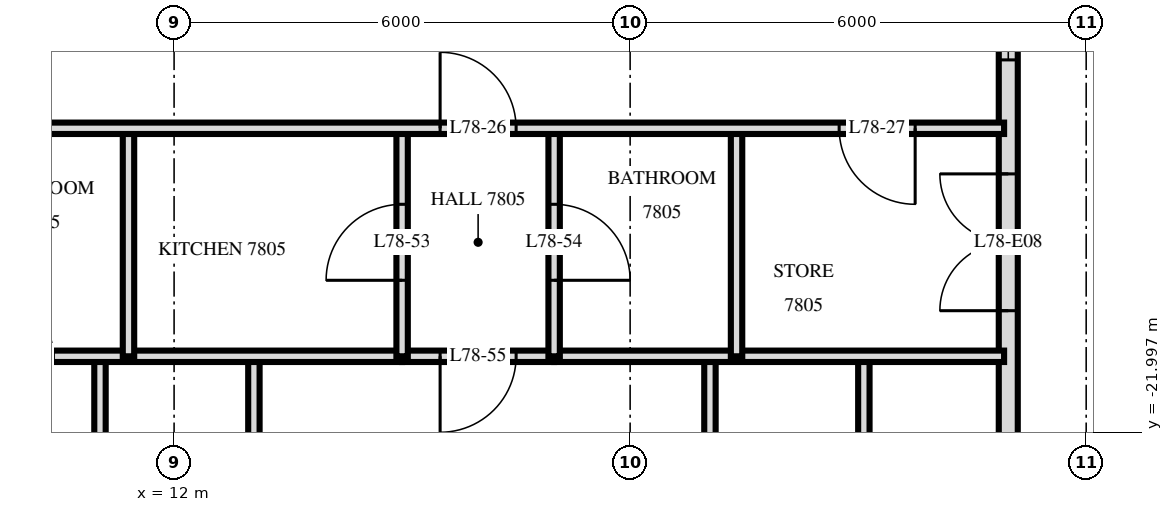
"""IFC4 building model, lengths in metres.
Left out: names, types, materials, properties, quantities, classifications, styles, units other than length and angle.
Written with IfcOpenShell. Run it as: python <this file> out.ifc"""

import sys

from ifc_helpers import new_model, si_unit, direction, frame, frame_2d, origin, place, context, subcontext, project, spatial, rectangle, extrude, element, fill, save


model = new_model("IFC4")
c1 = context("Model", 3, precision=1e-05, world=origin(), true_north=direction((0.0, 1.0)))
c2 = subcontext(c1, "Body", "Model", "MODEL_VIEW")
j1 = project(units=[si_unit("LENGTHUNIT", "METRE"), si_unit("PLANEANGLEUNIT", "RADIAN")], contexts=[c1])
p1 = place(None, origin())
s1 = spatial("IfcSite", under=j1, at=p1, CompositionType="ELEMENT")
p2 = place(p1, origin())
s2 = spatial("IfcBuilding", under=s1, at=p2, CompositionType="ELEMENT")
p3 = place(p2, frame((0.0, 0.0, 294.6)))
s3 = spatial("IfcBuildingStorey", under=s2, at=p3, CompositionType="ELEMENT", Elevation=294.6)
p4 = place(p3, frame((22.975, -29.275, 0.0), z_axis=(0.0, 0.0, 1.0), x_axis=(0.0, 1.0, 0.0)))
e1 = element("IfcWall", 1, at=p4, inside=s3, PredefinedType="SOLIDWALL", context=c2, shape_type="SweptSolid", body=[
    extrude(rectangle(XDim=25.951, YDim=0.25, at=frame_2d((12.975, 0.0))), origin(), (0.0, 0.0, 1.0), 3.22),
])
p5 = place(p4, frame((0.575, 0.0, 0.0)))
e2 = element("IfcOpeningElement", 2, at=p5, cuts=e1, PredefinedType="OPENING", context=c2, shape_type="SweptSolid", body=[
    extrude(rectangle(XDim=1.8, YDim=2.4, at=frame_2d((0.9, 1.2))), frame((0.0, 0.135, 0.0), z_axis=(0.0, -1.0, 0.0), x_axis=(1.0, 0.0, 0.0)), (0.0, 0.0, 1.0), 0.27),
])
p6 = place(p4, frame((3.325, 0.0, 0.9)))
e3 = element("IfcOpeningElement", 3, at=p6, cuts=e1, PredefinedType="OPENING", context=c2, shape_type="SweptSolid", body=[
    extrude(rectangle(XDim=1.8, YDim=1.5, at=frame_2d((0.9, 0.75))), frame((0.0, 0.135, 0.0), z_axis=(0.0, -1.0, 0.0), x_axis=(1.0, 0.0, 0.0)), (0.0, 0.0, 1.0), 0.27),
])
p7 = place(p4, frame((8.875, 0.0, 0.0)))
e4 = element("IfcOpeningElement", 4, at=p7, cuts=e1, PredefinedType="OPENING", context=c2, shape_type="SweptSolid", body=[
    extrude(rectangle(XDim=1.8, YDim=2.4, at=frame_2d((0.9, 1.2))), frame((0.0, 0.135, 0.0), z_axis=(0.0, -1.0, 0.0), x_axis=(1.0, 0.0, 0.0)), (0.0, 0.0, 1.0), 0.27),
])
p8 = place(p4, frame((12.175, 0.0, 0.9)))
e5 = element("IfcOpeningElement", 5, at=p8, cuts=e1, PredefinedType="OPENING", context=c2, shape_type="SweptSolid", body=[
    extrude(rectangle(XDim=1.2, YDim=1.5, at=frame_2d((0.6, 0.75))), frame((0.0, 0.135, 0.0), z_axis=(0.0, -1.0, 0.0), x_axis=(1.0, 0.0, 0.0)), (0.0, 0.0, 1.0), 0.27),
])
p9 = place(p4, frame((16.175, 0.0, 0.0)))
e6 = element("IfcOpeningElement", 6, at=p9, cuts=e1, PredefinedType="OPENING", context=c2, shape_type="SweptSolid", body=[
    extrude(rectangle(XDim=1.8, YDim=2.4, at=frame_2d((0.9, 1.2))), frame((0.0, 0.135, 0.0), z_axis=(0.0, -1.0, 0.0), x_axis=(1.0, 0.0, 0.0)), (0.0, 0.0, 1.0), 0.27),
])
p10 = place(p4, frame((23.425, 0.0, 0.0)))
e7 = element("IfcOpeningElement", 7, at=p10, cuts=e1, PredefinedType="OPENING", context=c2, shape_type="SweptSolid", body=[
    extrude(rectangle(XDim=1.8, YDim=2.4, at=frame_2d((0.9, 1.2))), frame((0.0, 0.135, 0.0), z_axis=(0.0, -1.0, 0.0), x_axis=(1.0, 0.0, 0.0)), (0.0, 0.0, 1.0), 0.27),
])
p11 = place(p3, frame((21.075, -32.666, 0.0), z_axis=(0.0, 0.0, 1.0), x_axis=(0.0, 1.0, 0.0)))
e8 = element("IfcWall", 8, at=p11, inside=s3, PredefinedType="PARTITIONING", context=c2, shape_type="SweptSolid", body=[
    extrude(rectangle(XDim=11.666, YDim=0.15, at=frame_2d((5.833, 0.0))), origin(), (0.0, 0.0, 1.0), 3.22),
])
p12 = place(p11, frame((5.246, 0.0, 0.0)))
e9 = element("IfcOpeningElement", 9, at=p12, cuts=e8, PredefinedType="OPENING", context=c2, shape_type="SweptSolid", body=[
    extrude(rectangle(XDim=0.9, YDim=2.1, at=frame_2d((0.45, 1.05))), frame((0.0, 0.085, 0.0), z_axis=(0.0, -1.0, 0.0), x_axis=(1.0, 0.0, 0.0)), (0.0, 0.0, 1.0), 0.17),
])
p13 = place(p3, frame((19.4, -21.0, 0.0), z_axis=(0.0, 0.0, 1.0), x_axis=(0.0, 1.0, 0.0)))
e10 = element("IfcWall", 10, at=p13, inside=s3, PredefinedType="PARTITIONING", context=c2, shape_type="SweptSolid", body=[
    extrude(rectangle(XDim=3.0, YDim=0.15, at=frame_2d((1.5, 0.0))), origin(), (0.0, 0.0, 1.0), 3.22),
])
p14 = place(p3, frame((19.05, -33.527, 0.0), z_axis=(0.0, 0.0, 1.0), x_axis=(0.0, 1.0, 0.0)))
e11 = element("IfcWall", 11, at=p14, inside=s3, PredefinedType="PARTITIONING", context=c2, shape_type="SweptSolid", body=[
    extrude(rectangle(XDim=12.527, YDim=0.15, at=frame_2d((6.264, 0.0))), origin(), (0.0, 0.0, 1.0), 3.22),
])
p15 = place(p14, frame((5.707, 0.0, 0.0)))
e12 = element("IfcOpeningElement", 12, at=p15, cuts=e11, PredefinedType="OPENING", context=c2, shape_type="SweptSolid", body=[
    extrude(rectangle(XDim=0.9, YDim=2.1, at=frame_2d((0.45, 1.05))), frame((0.0, 0.085, 0.0), z_axis=(0.0, -1.0, 0.0), x_axis=(1.0, 0.0, 0.0)), (0.0, 0.0, 1.0), 0.17),
])
p16 = place(p3, frame((17.0, -21.0, 0.0), z_axis=(0.0, 0.0, 1.0), x_axis=(0.0, 1.0, 0.0)))
e13 = element("IfcWall", 13, at=p16, inside=s3, PredefinedType="PARTITIONING", context=c2, shape_type="SweptSolid", body=[
    extrude(rectangle(XDim=3.0, YDim=0.15, at=frame_2d((1.5, 0.0))), origin(), (0.0, 0.0, 1.0), 3.22),
])
p17 = place(p16, frame((1.0, 0.0, 0.0)))
e14 = element("IfcOpeningElement", 14, at=p17, cuts=e13, PredefinedType="OPENING", context=c2, shape_type="SweptSolid", body=[
    extrude(rectangle(XDim=1.0, YDim=2.1, at=frame_2d((0.5, 1.05))), frame((0.0, 0.085, 0.0), z_axis=(0.0, -1.0, 0.0), x_axis=(1.0, 0.0, 0.0)), (0.0, 0.0, 1.0), 0.17),
])
p18 = place(p3, frame((15.0, -21.0, 0.0), z_axis=(0.0, 0.0, 1.0), x_axis=(0.0, 1.0, 0.0)))
e15 = element("IfcWall", 15, at=p18, inside=s3, PredefinedType="PARTITIONING", context=c2, shape_type="SweptSolid", body=[
    extrude(rectangle(XDim=3.0, YDim=0.15, at=frame_2d((1.5, 0.0))), origin(), (0.0, 0.0, 1.0), 3.22),
])
p19 = place(p18, frame((1.0, 0.0, 0.0)))
e16 = element("IfcOpeningElement", 16, at=p19, cuts=e15, PredefinedType="OPENING", context=c2, shape_type="SweptSolid", body=[
    extrude(rectangle(XDim=1.0, YDim=2.1, at=frame_2d((0.5, 1.05))), frame((0.0, 0.085, 0.0), z_axis=(0.0, -1.0, 0.0), x_axis=(1.0, 0.0, 0.0)), (0.0, 0.0, 1.0), 0.17),
])
p20 = place(p3, frame((13.05, -33.62, 0.0), z_axis=(0.0, 0.0, 1.0), x_axis=(0.0, 1.0, 0.0)))
e17 = element("IfcWall", 17, at=p20, inside=s3, PredefinedType="PARTITIONING", context=c2, shape_type="SweptSolid", body=[
    extrude(rectangle(XDim=12.62, YDim=0.15, at=frame_2d((6.31, 0.0))), origin(), (0.0, 0.0, 1.0), 3.22),
])
p21 = place(p20, frame((5.79, 0.0, 0.0)))
e18 = element("IfcOpeningElement", 18, at=p21, cuts=e17, PredefinedType="OPENING", context=c2, shape_type="SweptSolid", body=[
    extrude(rectangle(XDim=0.9, YDim=2.1, at=frame_2d((0.45, 1.05))), frame((0.0, 0.085, 0.0), z_axis=(0.0, -1.0, 0.0), x_axis=(1.0, 0.0, 0.0)), (0.0, 0.0, 1.0), 0.17),
])
p22 = place(p3, frame((11.4, -21.0, 0.0), z_axis=(0.0, 0.0, 1.0), x_axis=(0.0, 1.0, 0.0)))
e19 = element("IfcWall", 19, at=p22, inside=s3, PredefinedType="PARTITIONING", context=c2, shape_type="SweptSolid", body=[
    extrude(rectangle(XDim=3.0, YDim=0.15, at=frame_2d((1.5, 0.0))), origin(), (0.0, 0.0, 1.0), 3.22),
])
p23 = place(p3, frame((11.025, -33.62, 0.0), z_axis=(0.0, 0.0, 1.0), x_axis=(0.0, 1.0, 0.0)))
e20 = element("IfcWall", 20, at=p23, inside=s3, PredefinedType="PARTITIONING", context=c2, shape_type="SweptSolid", body=[
    extrude(rectangle(XDim=12.62, YDim=0.15, at=frame_2d((6.31, 0.0))), origin(), (0.0, 0.0, 1.0), 3.22),
])
p24 = place(p23, frame((5.79, 0.0, 0.0)))
e21 = element("IfcOpeningElement", 21, at=p24, cuts=e20, PredefinedType="OPENING", context=c2, shape_type="SweptSolid", body=[
    extrude(rectangle(XDim=0.9, YDim=2.1, at=frame_2d((0.45, 1.05))), frame((0.0, 0.085, 0.0), z_axis=(0.0, -1.0, 0.0), x_axis=(1.0, 0.0, 0.0)), (0.0, 0.0, 1.0), 0.17),
])
p25 = place(p3, frame((15.0, -21.0, 0.0), z_axis=(0.0, 0.0, 1.0), x_axis=(1.0, 0.0, 0.0)))
e22 = element("IfcWall", 22, at=p25, inside=s3, PredefinedType="PARTITIONING", context=c2, shape_type="SweptSolid", body=[
    extrude(rectangle(XDim=2.0, YDim=0.15, at=frame_2d((1.0, 0.0))), origin(), (0.0, 0.0, 1.0), 3.22),
])
p26 = place(p25, frame((0.5, 0.0, 0.0)))
e23 = element("IfcOpeningElement", 23, at=p26, cuts=e22, PredefinedType="OPENING", context=c2, shape_type="SweptSolid", body=[
    extrude(rectangle(XDim=1.0, YDim=2.1, at=frame_2d((0.5, 1.05))), frame((0.0, 0.085, 0.0), z_axis=(0.0, -1.0, 0.0), x_axis=(1.0, 0.0, 0.0)), (0.0, 0.0, 1.0), 0.17),
])
p27 = place(p3, frame((9.0, -21.0, 0.0), z_axis=(0.0, 0.0, 1.0), x_axis=(1.0, 0.0, 0.0)))
e24 = element("IfcWall", 24, at=p27, inside=s3, PredefinedType="PARTITIONING", context=c2, shape_type="SweptSolid", body=[
    extrude(rectangle(XDim=6.0, YDim=0.15, at=frame_2d((3.0, 0.0))), origin(), (0.0, 0.0, 1.0), 3.22),
])
p28 = place(p27, frame((0.612, 0.0, 0.0)))
e25 = element("IfcOpeningElement", 25, at=p28, cuts=e24, PredefinedType="OPENING", context=c2, shape_type="SweptSolid", body=[
    extrude(rectangle(XDim=0.8, YDim=2.1, at=frame_2d((0.4, 1.05))), frame((0.0, 0.085, 0.0), z_axis=(0.0, -1.0, 0.0), x_axis=(1.0, 0.0, 0.0)), (0.0, 0.0, 1.0), 0.17),
])
p29 = place(p3, frame((17.0, -21.0, 0.0), z_axis=(0.0, 0.0, 1.0), x_axis=(1.0, 0.0, 0.0)))
e26 = element("IfcWall", 26, at=p29, inside=s3, PredefinedType="PARTITIONING", context=c2, shape_type="SweptSolid", body=[
    extrude(rectangle(XDim=5.92, YDim=0.15, at=frame_2d((2.96, 0.0))), origin(), (0.0, 0.0, 1.0), 3.22),
])
p30 = place(p3, frame((-22.92, -18.0, 0.0), z_axis=(0.0, 0.0, 1.0), x_axis=(1.0, 0.0, 0.0)))
e27 = element("IfcWall", 27, at=p30, inside=s3, PredefinedType="PARTITIONING", context=c2, shape_type="SweptSolid", body=[
    extrude(rectangle(XDim=45.84, YDim=0.15, at=frame_2d((22.92, 0.0))), origin(), (0.0, 0.0, 1.0), 3.22),
])
p31 = place(p30, frame((17.07, 0.0, 0.0)))
e28 = element("IfcOpeningElement", 28, at=p31, cuts=e27, PredefinedType="OPENING", context=c2, shape_type="SweptSolid", body=[
    extrude(rectangle(XDim=1.0, YDim=2.1, at=frame_2d((0.5, 1.05))), frame((0.0, 0.085, 0.0), z_axis=(0.0, -1.0, 0.0), x_axis=(1.0, 0.0, 0.0)), (0.0, 0.0, 1.0), 0.17),
])
p32 = place(p30, frame((21.77, 0.0, 0.0)))
e29 = element("IfcOpeningElement", 29, at=p32, cuts=e27, PredefinedType="OPENING", context=c2, shape_type="SweptSolid", body=[
    extrude(rectangle(XDim=1.0, YDim=2.1, at=frame_2d((0.5, 1.05))), frame((0.0, 0.085, 0.0), z_axis=(0.0, -1.0, 0.0), x_axis=(1.0, 0.0, 0.0)), (0.0, 0.0, 1.0), 0.17),
])
p33 = place(p30, frame((28.72, 0.0, 0.0)))
e30 = element("IfcOpeningElement", 30, at=p33, cuts=e27, PredefinedType="OPENING", context=c2, shape_type="SweptSolid", body=[
    extrude(rectangle(XDim=1.0, YDim=2.1, at=frame_2d((0.5, 1.05))), frame((0.0, 0.085, 0.0), z_axis=(0.0, -1.0, 0.0), x_axis=(1.0, 0.0, 0.0)), (0.0, 0.0, 1.0), 0.17),
])
p34 = place(p30, frame((30.52, 0.0, 0.0)))
e31 = element("IfcOpeningElement", 31, at=p34, cuts=e27, PredefinedType="OPENING", context=c2, shape_type="SweptSolid", body=[
    extrude(rectangle(XDim=1.0, YDim=2.1, at=frame_2d((0.5, 1.05))), frame((0.0, 0.085, 0.0), z_axis=(0.0, -1.0, 0.0), x_axis=(1.0, 0.0, 0.0)), (0.0, 0.0, 1.0), 0.17),
])
p35 = place(p30, frame((9.42, 0.0, 0.0)))
e32 = element("IfcOpeningElement", 32, at=p35, cuts=e27, PredefinedType="OPENING", context=c2, shape_type="SweptSolid", body=[
    extrude(rectangle(XDim=1.0, YDim=2.1, at=frame_2d((0.5, 1.05))), frame((0.0, 0.085, 0.0), z_axis=(0.0, -1.0, 0.0), x_axis=(1.0, 0.0, 0.0)), (0.0, 0.0, 1.0), 0.17),
])
p36 = place(p30, frame((2.67, 0.0, 0.0)))
e33 = element("IfcOpeningElement", 33, at=p36, cuts=e27, PredefinedType="OPENING", context=c2, shape_type="SweptSolid", body=[
    extrude(rectangle(XDim=1.0, YDim=2.1, at=frame_2d((0.5, 1.05))), frame((0.0, 0.085, 0.0), z_axis=(0.0, -1.0, 0.0), x_axis=(1.0, 0.0, 0.0)), (0.0, 0.0, 1.0), 0.17),
])
p37 = place(p30, frame((38.42, 0.0, 0.0)))
e34 = element("IfcOpeningElement", 34, at=p37, cuts=e27, PredefinedType="OPENING", context=c2, shape_type="SweptSolid", body=[
    extrude(rectangle(XDim=1.0, YDim=2.1, at=frame_2d((0.5, 1.05))), frame((0.0, 0.085, 0.0), z_axis=(0.0, -1.0, 0.0), x_axis=(1.0, 0.0, 0.0)), (0.0, 0.0, 1.0), 0.17),
])
p38 = place(p30, frame((43.67, 0.0, 0.0)))
e35 = element("IfcOpeningElement", 35, at=p38, cuts=e27, PredefinedType="OPENING", context=c2, shape_type="SweptSolid", body=[
    extrude(rectangle(XDim=1.0, YDim=2.1, at=frame_2d((0.5, 1.05))), frame((0.0, 0.085, 0.0), z_axis=(0.0, -1.0, 0.0), x_axis=(1.0, 0.0, 0.0)), (0.0, 0.0, 1.0), 0.17),
])
p39 = place(p7, origin())
e36 = element("IfcDoor", 36, at=p39, inside=s3, OperationType="DOUBLE_DOOR_SINGLE_SWING", PredefinedType="DOOR", context=c2, shape_type="SweptSolid", body=[
    extrude(rectangle(XDim=1.8, YDim=2.4, at=frame_2d((0.9, 1.2))), frame((0.0, 0.025, 0.0), z_axis=(0.0, -1.0, 0.0), x_axis=(1.0, 0.0, 0.0)), (0.0, 0.0, 1.0), 0.05),
])
fill(e4, e36)
p40 = place(p8, origin())
e37 = element("IfcWindow", 37, at=p40, inside=s3, PartitioningType="SINGLE_PANEL", PredefinedType="WINDOW", context=c2, shape_type="SweptSolid", body=[
    extrude(rectangle(XDim=1.2, YDim=1.5, at=frame_2d((0.6, 0.75))), frame((0.0, 0.03, 0.0), z_axis=(0.0, -1.0, 0.0), x_axis=(1.0, 0.0, 0.0)), (0.0, 0.0, 1.0), 0.06),
])
fill(e5, e37)
p41 = place(p37, origin())
e38 = element("IfcDoor", 38, at=p41, inside=s3, OperationType="SINGLE_SWING_RIGHT", PredefinedType="DOOR", context=c2, shape_type="SweptSolid", body=[
    extrude(rectangle(XDim=1.0, YDim=2.1, at=frame_2d((0.5, 1.05))), frame((0.0, 0.025, 0.0), z_axis=(0.0, -1.0, 0.0), x_axis=(1.0, 0.0, 0.0)), (0.0, 0.0, 1.0), 0.05),
])
fill(e34, e38)
p42 = place(p38, frame((0.5, 0.0, 0.0), z_axis=(0.0, 0.0, 1.0), x_axis=(-1.0, 0.0, 0.0)))
e39 = element("IfcDoor", 39, at=p42, inside=s3, OperationType="SINGLE_SWING_RIGHT", PredefinedType="DOOR", context=c2, shape_type="SweptSolid", body=[
    extrude(rectangle(XDim=1.0, YDim=2.1, at=frame_2d((0.0, 1.05))), frame((0.0, -0.025, 0.0), z_axis=(0.0, 1.0, 0.0), x_axis=(-1.0, 0.0, 0.0)), (0.0, 0.0, 1.0), 0.05),
])
fill(e35, e39)
p43 = place(p28, origin())
e40 = element("IfcDoor", 40, at=p43, inside=s3, OperationType="SINGLE_SWING_RIGHT", PredefinedType="DOOR", context=c2, shape_type="SweptSolid", body=[
    extrude(rectangle(XDim=0.8, YDim=2.1, at=frame_2d((0.4, 1.05))), frame((0.0, 0.025, 0.0), z_axis=(0.0, -1.0, 0.0), x_axis=(1.0, 0.0, 0.0)), (0.0, 0.0, 1.0), 0.05),
])
fill(e25, e40)
p44 = place(p19, origin())
e41 = element("IfcDoor", 41, at=p44, inside=s3, OperationType="SINGLE_SWING_RIGHT", PredefinedType="DOOR", context=c2, shape_type="SweptSolid", body=[
    extrude(rectangle(XDim=1.0, YDim=2.1, at=frame_2d((0.5, 1.05))), frame((0.0, 0.025, 0.0), z_axis=(0.0, -1.0, 0.0), x_axis=(1.0, 0.0, 0.0)), (0.0, 0.0, 1.0), 0.05),
])
fill(e16, e41)
p45 = place(p17, frame((0.5, 0.0, 0.0), z_axis=(0.0, 0.0, 1.0), x_axis=(-1.0, 0.0, 0.0)))
e42 = element("IfcDoor", 42, at=p45, inside=s3, OperationType="SINGLE_SWING_LEFT", PredefinedType="DOOR", context=c2, shape_type="SweptSolid", body=[
    extrude(rectangle(XDim=1.0, YDim=2.1, at=frame_2d((0.0, 1.05))), frame((0.0, -0.025, 0.0), z_axis=(0.0, 1.0, 0.0), x_axis=(-1.0, 0.0, 0.0)), (0.0, 0.0, 1.0), 0.05),
])
fill(e14, e42)
p46 = place(p26, frame((0.5, 0.0, 0.0), z_axis=(0.0, 0.0, 1.0), x_axis=(-1.0, 0.0, 0.0)))
e43 = element("IfcDoor", 43, at=p46, inside=s3, OperationType="SINGLE_SWING_LEFT", PredefinedType="DOOR", context=c2, shape_type="SweptSolid", body=[
    extrude(rectangle(XDim=1.0, YDim=2.1, at=frame_2d((0.0, 1.05))), frame((0.0, -0.025, 0.0), z_axis=(0.0, 1.0, 0.0), x_axis=(-1.0, 0.0, 0.0)), (0.0, 0.0, 1.0), 0.05),
])
fill(e23, e43)
save(model, sys.argv[1])
